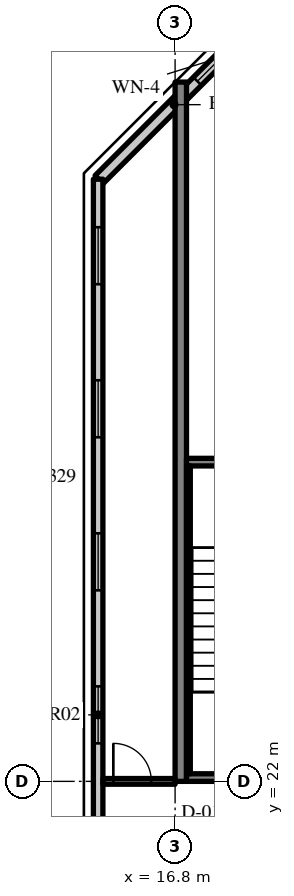
"""IFC4 building model, lengths in metres.
Left out: names, types, materials, properties, quantities, classifications, styles, units other than length and angle.
Written with IfcOpenShell. Run it as: python <this file> out.ifc"""

import sys

from ifc_helpers import new_model, si_unit, direction, frame, frame_2d, origin, place, context, subcontext, project, spatial, rectangle, extrude, source, transform, mapped, element, fill, save


model = new_model("IFC4")
c1 = context("Model", 3, precision=1e-05, world=origin(), true_north=direction((0.0, 1.0)))
c2 = subcontext(c1, "Body", "Model", "MODEL_VIEW")
j1 = project(units=[si_unit("LENGTHUNIT", "METRE"), si_unit("PLANEANGLEUNIT", "RADIAN")], contexts=[c1])
p1 = place(None, origin())
s1 = spatial("IfcSite", under=j1, at=p1, CompositionType="ELEMENT")
p2 = place(p1, origin())
s2 = spatial("IfcBuilding", under=s1, at=p2, CompositionType="ELEMENT")
p3 = place(p2, frame((0.0, 0.0, 260.8)))
s3 = spatial("IfcBuildingStorey", under=s2, at=p3, CompositionType="ELEMENT", Elevation=260.8)
m1 = source(origin(), c2, "Body", "SweptSolid", [
    extrude(rectangle(XDim=18.4, YDim=0.3, at=frame_2d((9.2, 0.0))), origin(), (0.0, 0.0, 1.0), 3.62),
])
p4 = place(p3, frame((16.95, 22.0, 0.0), z_axis=(0.0, 0.0, 1.0), x_axis=(0.0, 1.0, 0.0)))
e1 = element("IfcWall", 1, at=p4, inside=s3, PredefinedType="SHEAR", context=c2, shape_type="MappedRepresentation", body=[
    mapped(m1, transform((0.0, 0.0, 0.0), scale=1.0)),
])
m2 = source(origin(), c2, "Body", "SweptSolid", [
    extrude(rectangle(XDim=5.576, YDim=0.3, at=frame_2d((2.788, 0.0))), origin(), (0.0, 0.0, 1.0), 3.62),
])
p5 = place(p3, frame((18.743, 41.777, 0.0), z_axis=(0.0, 0.0, 1.0), x_axis=(-0.707106781187, -0.707106781187, 0.0)))
e2 = element("IfcWall", 2, at=p5, inside=s3, PredefinedType="SOLIDWALL", context=c2, shape_type="MappedRepresentation", body=[
    mapped(m2, transform((0.0, 0.0, 0.0), scale=1.0)),
])
m3 = source(origin(), c2, "Body", "SweptSolid", [
    extrude(rectangle(XDim=1.8, YDim=1.5, at=frame_2d((0.9, 0.75))), frame((0.0, 0.16, 0.0), z_axis=(0.0, -1.0, 0.0), x_axis=(1.0, 0.0, 0.0)), (0.0, 0.0, 1.0), 0.32),
])
p6 = place(p5, frame((0.118, 0.0, 0.9)))
e3 = element("IfcOpeningElement", 3, at=p6, cuts=e2, PredefinedType="OPENING", context=c2, shape_type="MappedRepresentation", body=[
    mapped(m3, transform((0.0, 0.0, 0.0), scale=1.0)),
])
m4 = source(origin(), c2, "Body", "SweptSolid", [
    extrude(rectangle(XDim=28.189, YDim=0.25, at=frame_2d((14.095, 0.0))), origin(), (0.0, 0.0, 1.0), 3.62),
])
p7 = place(p3, frame((14.775, 37.845, 0.0), z_axis=(0.0, 0.0, 1.0), x_axis=(0.0, -1.0, 0.0)))
e4 = element("IfcWall", 4, at=p7, inside=s3, PredefinedType="SOLIDWALL", context=c2, shape_type="MappedRepresentation", body=[
    mapped(m4, transform((0.0, 0.0, 0.0), scale=1.0)),
])
m5 = source(origin(), c2, "Body", "SweptSolid", [
    extrude(rectangle(XDim=1.5, YDim=1.5, at=frame_2d((0.75, 0.75))), frame((0.0, 0.135, 0.0), z_axis=(0.0, -1.0, 0.0), x_axis=(1.0, 0.0, 0.0)), (0.0, 0.0, 1.0), 0.27),
])
p8 = place(p7, frame((1.263, 0.0, 0.9)))
e5 = element("IfcOpeningElement", 5, at=p8, cuts=e4, PredefinedType="OPENING", context=c2, shape_type="MappedRepresentation", body=[
    mapped(m5, transform((0.0, 0.0, 0.0), scale=1.0)),
])
p9 = place(p7, frame((5.291, 0.0, 0.9)))
e6 = element("IfcOpeningElement", 6, at=p9, cuts=e4, PredefinedType="OPENING", context=c2, shape_type="MappedRepresentation", body=[
    mapped(m5, transform((0.0, 0.0, 0.0), scale=1.0)),
])
p10 = place(p7, frame((9.318, 0.0, 0.9)))
e7 = element("IfcOpeningElement", 7, at=p10, cuts=e4, PredefinedType="OPENING", context=c2, shape_type="MappedRepresentation", body=[
    mapped(m5, transform((0.0, 0.0, 0.0), scale=1.0)),
])
p11 = place(p7, frame((13.345, 0.0, 0.9)))
e8 = element("IfcOpeningElement", 8, at=p11, cuts=e4, PredefinedType="OPENING", context=c2, shape_type="MappedRepresentation", body=[
    mapped(m5, transform((0.0, 0.0, 0.0), scale=1.0)),
])
p12 = place(p7, frame((17.372, 0.0, 0.9)))
e9 = element("IfcOpeningElement", 9, at=p12, cuts=e4, PredefinedType="OPENING", context=c2, shape_type="MappedRepresentation", body=[
    mapped(m5, transform((0.0, 0.0, 0.0), scale=1.0)),
])
p13 = place(p7, frame((21.399, 0.0, 0.9)))
e10 = element("IfcOpeningElement", 10, at=p13, cuts=e4, PredefinedType="OPENING", context=c2, shape_type="MappedRepresentation", body=[
    mapped(m5, transform((0.0, 0.0, 0.0), scale=1.0)),
])
p14 = place(p7, frame((25.426, 0.0, 0.9)))
e11 = element("IfcOpeningElement", 11, at=p14, cuts=e4, PredefinedType="OPENING", context=c2, shape_type="MappedRepresentation", body=[
    mapped(m5, transform((0.0, 0.0, 0.0), scale=1.0)),
])
m6 = source(origin(), c2, "Body", "SweptSolid", [
    extrude(rectangle(XDim=8.1, YDim=0.2, at=frame_2d((4.05, 0.0))), origin(), (0.0, 0.0, 1.0), 3.62),
])
p15 = place(p3, frame((17.1, 22.1, 0.0), z_axis=(0.0, 0.0, 1.0), x_axis=(1.0, 0.0, 0.0)))
e12 = element("IfcWall", 12, at=p15, inside=s3, PredefinedType="SOLIDWALL", context=c2, shape_type="MappedRepresentation", body=[
    mapped(m6, transform((0.0, 0.0, 0.0), scale=1.0)),
])
m7 = source(origin(), c2, "Body", "SweptSolid", [
    extrude(rectangle(XDim=1.2, YDim=2.1, at=frame_2d((0.6, 1.05))), frame((0.0, 0.11, 0.0), z_axis=(0.0, -1.0, 0.0), x_axis=(1.0, 0.0, 0.0)), (0.0, 0.0, 1.0), 0.22),
])
p16 = place(p15, frame((5.9, 0.0, 0.0)))
e13 = element("IfcOpeningElement", 13, at=p16, cuts=e12, PredefinedType="OPENING", context=c2, shape_type="MappedRepresentation", body=[
    mapped(m7, transform((0.0, 0.0, 0.0), scale=1.0)),
])
p17 = place(p3, frame((17.1, 30.4, 0.0), z_axis=(0.0, 0.0, 1.0), x_axis=(1.0, 0.0, 0.0)))
e14 = element("IfcWall", 14, at=p17, inside=s3, PredefinedType="SOLIDWALL", context=c2, shape_type="MappedRepresentation", body=[
    mapped(m6, transform((0.0, 0.0, 0.0), scale=1.0)),
])
m8 = source(origin(), c2, "Body", "SweptSolid", [
    extrude(rectangle(XDim=1.0, YDim=2.1, at=frame_2d((0.5, 1.05))), frame((0.0, 0.11, 0.0), z_axis=(0.0, -1.0, 0.0), x_axis=(1.0, 0.0, 0.0)), (0.0, 0.0, 1.0), 0.22),
])
p18 = place(p17, frame((6.0, 0.0, 0.0)))
e15 = element("IfcOpeningElement", 15, at=p18, cuts=e14, PredefinedType="OPENING", context=c2, shape_type="MappedRepresentation", body=[
    mapped(m8, transform((0.0, 0.0, 0.0), scale=1.0)),
])
m9 = source(origin(), c2, "Body", "SweptSolid", [
    extrude(rectangle(XDim=8.1, YDim=0.1, at=frame_2d((4.05, 0.0))), origin(), (0.0, 0.0, 1.0), 3.62),
])
p19 = place(p3, frame((17.15, 22.2, 0.0), z_axis=(0.0, 0.0, 1.0), x_axis=(0.0, 1.0, 0.0)))
e16 = element("IfcWall", 16, at=p19, inside=s3, PredefinedType="SOLIDWALL", context=c2, shape_type="MappedRepresentation", body=[
    mapped(m9, transform((0.0, 0.0, 0.0), scale=1.0)),
])
m10 = source(origin(), c2, "Body", "SweptSolid", [
    extrude(rectangle(XDim=1.9, YDim=0.15, at=frame_2d((0.95, 0.0))), origin(), (0.0, 0.0, 1.0), 2.92),
])
p20 = place(p3, frame((14.9, 22.0, 0.0), z_axis=(0.0, 0.0, 1.0), x_axis=(1.0, 0.0, 0.0)))
e17 = element("IfcWall", 17, at=p20, inside=s3, PredefinedType="PARTITIONING", context=c2, shape_type="MappedRepresentation", body=[
    mapped(m10, transform((0.0, 0.0, 0.0), scale=1.0)),
])
m11 = source(origin(), c2, "Body", "SweptSolid", [
    extrude(rectangle(XDim=1.0, YDim=2.1, at=frame_2d((0.5, 1.05))), frame((0.0, 0.085, 0.0), z_axis=(0.0, -1.0, 0.0), x_axis=(1.0, 0.0, 0.0)), (0.0, 0.0, 1.0), 0.17),
])
p21 = place(p20, frame((0.275, 0.0, 0.0)))
e18 = element("IfcOpeningElement", 18, at=p21, cuts=e17, PredefinedType="OPENING", context=c2, shape_type="MappedRepresentation", body=[
    mapped(m11, transform((0.0, 0.0, 0.0), scale=1.0)),
])
m12 = source(origin(), c2, "Body", "SweptSolid", [
    extrude(rectangle(XDim=1.8, YDim=1.5, at=frame_2d((0.9, 0.75))), frame((0.0, 0.03, 0.0), z_axis=(0.0, -1.0, 0.0), x_axis=(1.0, 0.0, 0.0)), (0.0, 0.0, 1.0), 0.06),
])
p22 = place(p6, origin())
e19 = element("IfcWindow", 19, at=p22, inside=s3, PartitioningType="SINGLE_PANEL", PredefinedType="WINDOW", context=c2, shape_type="MappedRepresentation", body=[
    mapped(m12, transform((0.0, 0.0, 0.0), scale=1.0)),
])
fill(e3, e19)
m13 = source(origin(), c2, "Body", "SweptSolid", [
    extrude(rectangle(XDim=1.5, YDim=1.5, at=frame_2d((0.75, 0.75))), frame((0.0, 0.03, 0.0), z_axis=(0.0, -1.0, 0.0), x_axis=(1.0, 0.0, 0.0)), (0.0, 0.0, 1.0), 0.06),
])
p23 = place(p8, origin())
e20 = element("IfcWindow", 20, at=p23, inside=s3, PartitioningType="SINGLE_PANEL", PredefinedType="WINDOW", context=c2, shape_type="MappedRepresentation", body=[
    mapped(m13, transform((0.0, 0.0, 0.0), scale=1.0)),
])
fill(e5, e20)
p24 = place(p9, origin())
e21 = element("IfcWindow", 21, at=p24, inside=s3, PartitioningType="SINGLE_PANEL", PredefinedType="WINDOW", context=c2, shape_type="MappedRepresentation", body=[
    mapped(m13, transform((0.0, 0.0, 0.0), scale=1.0)),
])
fill(e6, e21)
p25 = place(p10, origin())
e22 = element("IfcWindow", 22, at=p25, inside=s3, PartitioningType="SINGLE_PANEL", PredefinedType="WINDOW", context=c2, shape_type="MappedRepresentation", body=[
    mapped(m13, transform((0.0, 0.0, 0.0), scale=1.0)),
])
fill(e7, e22)
p26 = place(p11, origin())
e23 = element("IfcWindow", 23, at=p26, inside=s3, PartitioningType="SINGLE_PANEL", PredefinedType="WINDOW", context=c2, shape_type="MappedRepresentation", body=[
    mapped(m13, transform((0.0, 0.0, 0.0), scale=1.0)),
])
fill(e8, e23)
m14 = source(origin(), c2, "Body", "SweptSolid", [
    extrude(rectangle(XDim=1.0, YDim=2.1, at=frame_2d((0.5, 1.05))), frame((0.0, 0.025, 0.0), z_axis=(0.0, -1.0, 0.0), x_axis=(1.0, 0.0, 0.0)), (0.0, 0.0, 1.0), 0.05),
])
p27 = place(p21, origin())
e24 = element("IfcDoor", 24, at=p27, inside=s3, OperationType="SINGLE_SWING_LEFT", PredefinedType="DOOR", context=c2, shape_type="MappedRepresentation", body=[
    mapped(m14, transform((0.0, 0.0, 0.0), scale=1.0)),
])
fill(e18, e24)
save(model, sys.argv[1])
